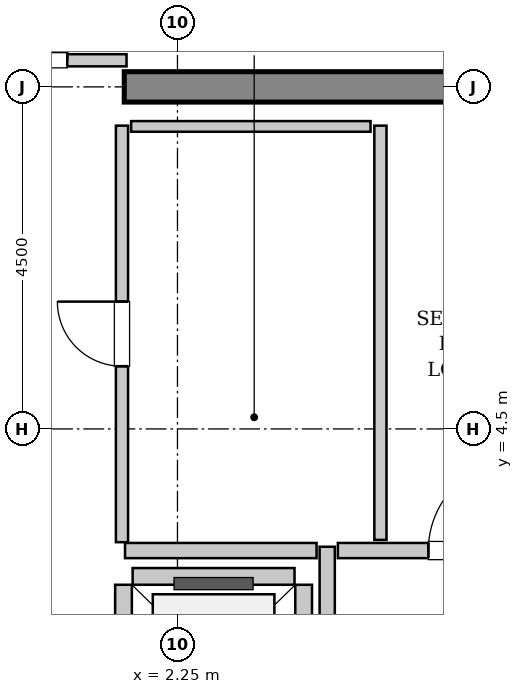
"""IFC4 building model, lengths in metres.
Left out: names, types, materials, properties, quantities, classifications, styles, units other than length and angle.
Written with IfcOpenShell. Run it as: python <this file> out.ifc"""

import sys

from ifc_helpers import new_model, si_unit, direction, frame, frame_2d, origin, place, context, subcontext, project, spatial, rectangle, extrude, source, transform, mapped, element, fill, save


model = new_model("IFC4")
c1 = context("Model", 3, precision=1e-05, world=origin(), true_north=direction((0.0, 1.0)))
c2 = subcontext(c1, "Body", "Model", "MODEL_VIEW")
j1 = project(units=[si_unit("LENGTHUNIT", "METRE"), si_unit("PLANEANGLEUNIT", "RADIAN")], contexts=[c1])
p1 = place(None, origin())
s1 = spatial("IfcSite", under=j1, at=p1, CompositionType="ELEMENT")
p2 = place(p1, origin())
s2 = spatial("IfcBuilding", under=s1, at=p2, CompositionType="ELEMENT")
p3 = place(p2, frame((0.0, 0.0, 353.8)))
s3 = spatial("IfcBuildingStorey", under=s2, at=p3, CompositionType="ELEMENT", Elevation=353.8)
m1 = source(origin(), c2, "Body", "SweptSolid", [
    extrude(rectangle(XDim=9.9, YDim=0.4, at=frame_2d((4.95, 0.0))), origin(), (0.0, 0.0, 1.0), 4.8),
])
p4 = place(p3, frame((1.55, 9.0, 0.0), z_axis=(0.0, 0.0, 1.0), x_axis=(1.0, 0.0, 0.0)))
e1 = element("IfcWall", 1, at=p4, inside=s3, PredefinedType="SHEAR", context=c2, shape_type="MappedRepresentation", body=[
    mapped(m1, transform((0.0, 0.0, 0.0), x_axis=(1.0, 0.0, 0.0), y_axis=(0.0, 1.0, 0.0), z_axis=(0.0, 0.0, 1.0), scale=1.0)),
])
m2 = source(origin(), c2, "Body", "SweptSolid", [
    extrude(rectangle(XDim=4.9, YDim=0.22, at=frame_2d((2.45, 0.0))), origin(), (0.0, 0.0, 1.0), 4.485),
])
p5 = place(p3, frame((1.54, 2.45, 0.0), z_axis=(0.0, 0.0, 1.0), x_axis=(0.0, -1.0, 0.0)))
e2 = element("IfcWall", 2, at=p5, inside=s3, PredefinedType="SOLIDWALL", context=c2, shape_type="MappedRepresentation", body=[
    mapped(m2, transform((0.0, 0.0, 0.0), x_axis=(1.0, 0.0, 0.0), y_axis=(0.0, 1.0, 0.0), z_axis=(0.0, 0.0, 1.0), scale=1.0)),
])
p6 = place(p5, frame((3.3, 0.0, 0.0)))
e3 = element("IfcOpeningElement", 3, at=p6, cuts=e2, PredefinedType="OPENING", context=c2, shape_type="SweptSolid", body=[
    extrude(rectangle(XDim=1.1, YDim=2.2, at=frame_2d((0.55, 1.1))), frame((0.0, 0.12, 0.0), z_axis=(0.0, -1.0, 0.0), x_axis=(1.0, 0.0, 0.0)), (0.0, 0.0, 1.0), 0.24),
])
p7 = place(p5, frame((0.5, 0.0, 0.0)))
e4 = element("IfcOpeningElement", 4, at=p7, cuts=e2, PredefinedType="OPENING", context=c2, shape_type="SweptSolid", body=[
    extrude(rectangle(XDim=1.1, YDim=2.2, at=frame_2d((0.55, 1.1))), frame((0.0, 0.12, 0.0), z_axis=(0.0, -1.0, 0.0), x_axis=(1.0, 0.0, 0.0)), (0.0, 0.0, 1.0), 0.24),
])
p8 = place(p3, frame((3.91, -2.45, 0.0), z_axis=(0.0, 0.0, 1.0), x_axis=(0.0, 1.0, 0.0)))
e5 = element("IfcWall", 5, at=p8, inside=s3, PredefinedType="SOLIDWALL", context=c2, shape_type="MappedRepresentation", body=[
    mapped(m2, transform((0.0, 0.0, 0.0), x_axis=(1.0, 0.0, 0.0), y_axis=(0.0, 1.0, 0.0), z_axis=(0.0, 0.0, 1.0), scale=1.0)),
])
m3 = source(origin(), c2, "Body", "SweptSolid", [
    extrude(rectangle(XDim=2.13, YDim=0.22, at=frame_2d((1.065, 0.0))), origin(), (0.0, 0.0, 1.0), 4.485),
])
p9 = place(p3, frame((3.79, 2.56, 0.0), z_axis=(0.0, 0.0, 1.0), x_axis=(-1.0, 0.0, 0.0)))
e6 = element("IfcWall", 6, at=p9, inside=s3, PredefinedType="SOLIDWALL", context=c2, shape_type="MappedRepresentation", body=[
    mapped(m3, transform((0.0, 0.0, 0.0), x_axis=(1.0, 0.0, 0.0), y_axis=(0.0, 1.0, 0.0), z_axis=(0.0, 0.0, 1.0), scale=1.0)),
])
m4 = source(origin(), c2, "Body", "SweptSolid", [
    extrude(rectangle(XDim=5.9, YDim=0.2, at=frame_2d((2.95, 0.0))), origin(), (0.0, 0.0, 1.0), 4.485),
])
p10 = place(p3, frame((4.22, -2.95, 0.0), z_axis=(0.0, 0.0, 1.0), x_axis=(0.0, 1.0, 0.0)))
e7 = element("IfcWall", 7, at=p10, inside=s3, PredefinedType="PARTITIONING", context=c2, shape_type="MappedRepresentation", body=[
    mapped(m4, transform((0.0, 0.0, 0.0), x_axis=(1.0, 0.0, 0.0), y_axis=(0.0, 1.0, 0.0), z_axis=(0.0, 0.0, 1.0), scale=1.0)),
])
m5 = source(origin(), c2, "Body", "SweptSolid", [
    extrude(rectangle(XDim=2.52, YDim=0.2, at=frame_2d((1.26, 0.0))), origin(), (0.0, 0.0, 1.0), 4.485),
])
p11 = place(p3, frame((1.56, 2.9, 0.0), z_axis=(0.0, 0.0, 1.0), x_axis=(1.0, 0.0, 0.0)))
e8 = element("IfcWall", 8, at=p11, inside=s3, PredefinedType="PARTITIONING", context=c2, shape_type="MappedRepresentation", body=[
    mapped(m5, transform((0.0, 0.0, 0.0), x_axis=(1.0, 0.0, 0.0), y_axis=(0.0, 1.0, 0.0), z_axis=(0.0, 0.0, 1.0), scale=1.0)),
])
m6 = source(origin(), c2, "Body", "SweptSolid", [
    extrude(rectangle(XDim=3.04, YDim=0.2, at=frame_2d((1.52, 0.0))), origin(), (0.0, 0.0, 1.0), 4.485),
])
p12 = place(p3, frame((4.36, 2.9, 0.0), z_axis=(0.0, 0.0, 1.0), x_axis=(1.0, 0.0, 0.0)))
e9 = element("IfcWall", 9, at=p12, inside=s3, PredefinedType="PARTITIONING", context=c2, shape_type="MappedRepresentation", body=[
    mapped(m6, transform((0.0, 0.0, 0.0), x_axis=(1.0, 0.0, 0.0), y_axis=(0.0, 1.0, 0.0), z_axis=(0.0, 0.0, 1.0), scale=1.0)),
])
p13 = place(p12, frame((1.19, 0.0, 0.0)))
e10 = element("IfcOpeningElement", 10, at=p13, cuts=e9, PredefinedType="OPENING", context=c2, shape_type="SweptSolid", body=[
    extrude(rectangle(XDim=1.2, YDim=2.15, at=frame_2d((0.6, 1.075))), frame((0.0, 0.11, 0.0), z_axis=(0.0, -1.0, 0.0), x_axis=(1.0, 0.0, 0.0)), (0.0, 0.0, 1.0), 0.22),
])
m7 = source(origin(), c2, "Body", "SweptSolid", [
    extrude(rectangle(XDim=3.16, YDim=0.16, at=frame_2d((1.58, 0.0))), origin(), (0.0, 0.0, 1.0), 3.575),
])
p14 = place(p3, frame((-1.58, 9.35, 0.0), z_axis=(0.0, 0.0, 1.0), x_axis=(1.0, 0.0, 0.0)))
e11 = element("IfcWall", 11, at=p14, inside=s3, PredefinedType="PARTITIONING", context=c2, shape_type="MappedRepresentation", body=[
    mapped(m7, transform((0.0, 0.0, 0.0), x_axis=(1.0, 0.0, 0.0), y_axis=(0.0, 1.0, 0.0), z_axis=(0.0, 0.0, 1.0), scale=1.0)),
])
p15 = place(p14, frame((0.78, 0.0, 0.0)))
e12 = element("IfcOpeningElement", 12, at=p15, cuts=e11, PredefinedType="OPENING", context=c2, shape_type="SweptSolid", body=[
    extrude(rectangle(XDim=1.6, YDim=2.3, at=frame_2d((0.8, 1.15))), frame((0.0, 0.09, 0.0), z_axis=(0.0, -1.0, 0.0), x_axis=(1.0, 0.0, 0.0)), (0.0, 0.0, 1.0), 0.18),
])
m8 = source(origin(), c2, "Body", "SweptSolid", [
    extrude(rectangle(XDim=5.45, YDim=0.16, at=frame_2d((2.725, 0.0))), origin(), (0.0, 0.0, 1.0), 4.485),
])
p16 = place(p3, frame((4.92, 3.04, 0.0), z_axis=(0.0, 0.0, 1.0), x_axis=(0.0, 1.0, 0.0)))
e13 = element("IfcWall", 13, at=p16, inside=s3, PredefinedType="PARTITIONING", context=c2, shape_type="MappedRepresentation", body=[
    mapped(m8, transform((0.0, 0.0, 0.0), x_axis=(1.0, 0.0, 0.0), y_axis=(0.0, 1.0, 0.0), z_axis=(0.0, 0.0, 1.0), scale=1.0)),
])
m9 = source(origin(), c2, "Body", "SweptSolid", [
    extrude(rectangle(XDim=5.48, YDim=0.16, at=frame_2d((2.74, 0.0))), origin(), (0.0, 0.0, 1.0), 4.485),
])
p17 = place(p3, frame((1.52, 3.01, 0.0), z_axis=(0.0, 0.0, 1.0), x_axis=(0.0, 1.0, 0.0)))
e14 = element("IfcWall", 14, at=p17, inside=s3, PredefinedType="PARTITIONING", context=c2, shape_type="MappedRepresentation", body=[
    mapped(m9, transform((0.0, 0.0, 0.0), x_axis=(1.0, 0.0, 0.0), y_axis=(0.0, 1.0, 0.0), z_axis=(0.0, 0.0, 1.0), scale=1.0)),
])
p18 = place(p17, frame((2.315, 0.0, 0.0)))
e15 = element("IfcOpeningElement", 15, at=p18, cuts=e14, PredefinedType="OPENING", context=c2, shape_type="SweptSolid", body=[
    extrude(rectangle(XDim=0.85, YDim=2.1, at=frame_2d((0.425, 1.05))), frame((0.0, 0.09, 0.0), z_axis=(0.0, -1.0, 0.0), x_axis=(1.0, 0.0, 0.0)), (0.0, 0.0, 1.0), 0.18),
])
m10 = source(origin(), c2, "Body", "SweptSolid", [
    extrude(rectangle(XDim=3.15, YDim=0.14, at=frame_2d((1.575, 0.0))), origin(), (0.0, 0.0, 1.0), 4.485),
])
p19 = place(p3, frame((1.64, 8.48, 0.0), z_axis=(0.0, 0.0, 1.0), x_axis=(1.0, 0.0, 0.0)))
e16 = element("IfcWall", 16, at=p19, inside=s3, PredefinedType="PARTITIONING", context=c2, shape_type="MappedRepresentation", body=[
    mapped(m10, transform((0.0, 0.0, 0.0), x_axis=(1.0, 0.0, 0.0), y_axis=(0.0, 1.0, 0.0), z_axis=(0.0, 0.0, 1.0), scale=1.0)),
])
m11 = source(origin(), c2, "Body", "SweptSolid", [
    extrude(rectangle(XDim=1.2, YDim=2.15, at=frame_2d((0.6, 1.075))), frame((0.0, 0.025, 0.0), z_axis=(0.0, -1.0, 0.0), x_axis=(1.0, 0.0, 0.0)), (0.0, 0.0, 1.0), 0.05),
])
p20 = place(p13, origin())
e17 = element("IfcDoor", 17, at=p20, inside=s3, OperationType="SINGLE_SWING_RIGHT", PredefinedType="DOOR", context=c2, shape_type="MappedRepresentation", body=[
    mapped(m11, transform((0.0, 0.0, 0.0), x_axis=(1.0, 0.0, 0.0), y_axis=(0.0, 1.0, 0.0), z_axis=(0.0, 0.0, 1.0), scale=1.0)),
])
fill(e10, e17)
m12 = source(origin(), c2, "Body", "SweptSolid", [
    extrude(rectangle(XDim=1.6, YDim=2.3, at=frame_2d((0.8, 1.15))), frame((0.0, 0.025, 0.0), z_axis=(0.0, -1.0, 0.0), x_axis=(1.0, 0.0, 0.0)), (0.0, 0.0, 1.0), 0.05),
])
p21 = place(p15, origin())
e18 = element("IfcDoor", 18, at=p21, inside=s3, OperationType="DOUBLE_DOOR_SINGLE_SWING", PredefinedType="DOOR", context=c2, shape_type="MappedRepresentation", body=[
    mapped(m12, transform((0.0, 0.0, 0.0), x_axis=(1.0, 0.0, 0.0), y_axis=(0.0, 1.0, 0.0), z_axis=(0.0, 0.0, 1.0), scale=1.0)),
])
fill(e12, e18)
m13 = source(origin(), c2, "Body", "SweptSolid", [
    extrude(rectangle(XDim=0.85, YDim=2.1, at=frame_2d((0.425, 1.05))), frame((0.0, 0.025, 0.0), z_axis=(0.0, -1.0, 0.0), x_axis=(1.0, 0.0, 0.0)), (0.0, 0.0, 1.0), 0.05),
])
p22 = place(p18, origin())
e19 = element("IfcDoor", 19, at=p22, inside=s3, OperationType="SINGLE_SWING_RIGHT", PredefinedType="DOOR", context=c2, shape_type="MappedRepresentation", body=[
    mapped(m13, transform((0.0, 0.0, 0.0), x_axis=(1.0, 0.0, 0.0), y_axis=(0.0, 1.0, 0.0), z_axis=(0.0, 0.0, 1.0), scale=1.0)),
])
fill(e15, e19)
save(model, sys.argv[1])
